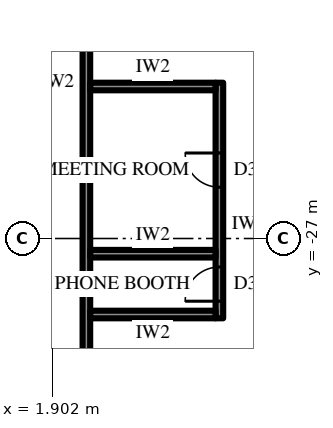
"""IFC4 building model, lengths in metres.
Left out: names, types, materials, properties, quantities, classifications, styles, units other than length and angle.
Written with IfcOpenShell. Run it as: python <this file> out.ifc"""

import sys

from ifc_helpers import new_model, si_unit, direction, frame, frame_2d, origin, place, context, subcontext, project, spatial, rectangle, extrude, element, fill, save


model = new_model("IFC4")
c1 = context("Model", 3, precision=1e-05, world=origin(), true_north=direction((0.0, 1.0)))
c2 = subcontext(c1, "Body", "Model", "MODEL_VIEW")
j1 = project(units=[si_unit("LENGTHUNIT", "METRE"), si_unit("PLANEANGLEUNIT", "RADIAN")], contexts=[c1])
p1 = place(None, origin())
s1 = spatial("IfcSite", under=j1, at=p1, CompositionType="ELEMENT")
p2 = place(p1, origin())
s2 = spatial("IfcBuilding", under=s1, at=p2, CompositionType="ELEMENT")
p3 = place(p2, frame((0.0, 0.0, 78.1)))
s3 = spatial("IfcBuildingStorey", under=s2, at=p3, CompositionType="ELEMENT", Elevation=78.1)
p4 = place(p3, frame((2.8, -18.2, 0.0), z_axis=(0.0, 0.0, 1.0), x_axis=(0.0, -1.0, 0.0)))
e1 = element("IfcWall", 1, at=p4, inside=s3, PredefinedType="PARTITIONING", context=c2, shape_type="SweptSolid", body=[
    extrude(rectangle(XDim=15.6, YDim=0.2, at=frame_2d((7.8, 0.0))), origin(), (0.0, 0.0, 1.0), 2.944),
])
p5 = place(p4, frame((1.06, 0.0, 0.0)))
e2 = element("IfcOpeningElement", 2, at=p5, cuts=e1, PredefinedType="OPENING", context=c2, shape_type="SweptSolid", body=[
    extrude(rectangle(XDim=1.0, YDim=2.2, at=frame_2d((0.5, 1.1))), frame((0.0, 0.11, 0.0), z_axis=(0.0, -1.0, 0.0), x_axis=(1.0, 0.0, 0.0)), (0.0, 0.0, 1.0), 0.22),
])
p6 = place(p3, frame((6.3, -22.9, 0.0), z_axis=(0.0, 0.0, 1.0), x_axis=(0.0, -1.0, 0.0)))
e3 = element("IfcWall", 3, at=p6, inside=s3, PredefinedType="PARTITIONING", context=c2, shape_type="SweptSolid", body=[
    extrude(rectangle(XDim=6.2, YDim=0.2, at=frame_2d((3.1, 0.0))), origin(), (0.0, 0.0, 1.0), 4.0),
])
p7 = place(p6, frame((1.85, 0.0, 0.0)))
e4 = element("IfcOpeningElement", 4, at=p7, cuts=e3, PredefinedType="OPENING", context=c2, shape_type="SweptSolid", body=[
    extrude(rectangle(XDim=0.9, YDim=2.2, at=frame_2d((0.45, 1.1))), frame((0.0, 0.11, 0.0), z_axis=(0.0, -1.0, 0.0), x_axis=(1.0, 0.0, 0.0)), (0.0, 0.0, 1.0), 0.22),
])
p8 = place(p6, frame((4.85, 0.0, 0.0)))
e5 = element("IfcOpeningElement", 5, at=p8, cuts=e3, PredefinedType="OPENING", context=c2, shape_type="SweptSolid", body=[
    extrude(rectangle(XDim=0.9, YDim=2.2, at=frame_2d((0.45, 1.1))), frame((0.0, 0.11, 0.0), z_axis=(0.0, -1.0, 0.0), x_axis=(1.0, 0.0, 0.0)), (0.0, 0.0, 1.0), 0.22),
])
for number, where, z_axis, x_axis in (
    (6, (2.9, -23.0, 0.0), (0.0, 0.0, 1.0), (1.0, 0.0, 0.0)),
    (7, (2.9, -27.4, 0.0), (0.0, 0.0, 1.0), (1.0, 0.0, 0.0)),
    (8, (2.9, -29.0, 0.0), (0.0, 0.0, 1.0), (1.0, 0.0, 0.0)),
):
    element("IfcWall", number, at=place(p3, frame(where, z_axis=z_axis, x_axis=x_axis)), inside=s3, PredefinedType="PARTITIONING", context=c2, shape_type="SweptSolid", body=[
        extrude(rectangle(XDim=3.3, YDim=0.2, at=frame_2d((1.65, 0.0))), origin(), (0.0, 0.0, 1.0), 4.0),
    ])
p9 = place(p7, frame((0.9, 0.0, 0.0), z_axis=(0.0, 0.0, 1.0), x_axis=(-1.0, 0.0, 0.0)))
e9 = element("IfcDoor", 9, at=p9, inside=s3, OperationType="SINGLE_SWING_LEFT", PredefinedType="DOOR", context=c2, shape_type="SweptSolid", body=[
    extrude(rectangle(XDim=0.9, YDim=2.2, at=frame_2d((0.45, 1.1))), frame((0.0, 0.025, 0.0), z_axis=(0.0, -1.0, 0.0), x_axis=(1.0, 0.0, 0.0)), (0.0, 0.0, 1.0), 0.05),
])
fill(e4, e9)
p10 = place(p8, frame((0.9, 0.0, 0.0), z_axis=(0.0, 0.0, 1.0), x_axis=(-1.0, 0.0, 0.0)))
e10 = element("IfcDoor", 10, at=p10, inside=s3, OperationType="SINGLE_SWING_RIGHT", PredefinedType="DOOR", context=c2, shape_type="SweptSolid", body=[
    extrude(rectangle(XDim=0.9, YDim=2.2, at=frame_2d((0.45, 1.1))), frame((0.0, 0.025, 0.0), z_axis=(0.0, -1.0, 0.0), x_axis=(1.0, 0.0, 0.0)), (0.0, 0.0, 1.0), 0.05),
])
fill(e5, e10)
save(model, sys.argv[1])
